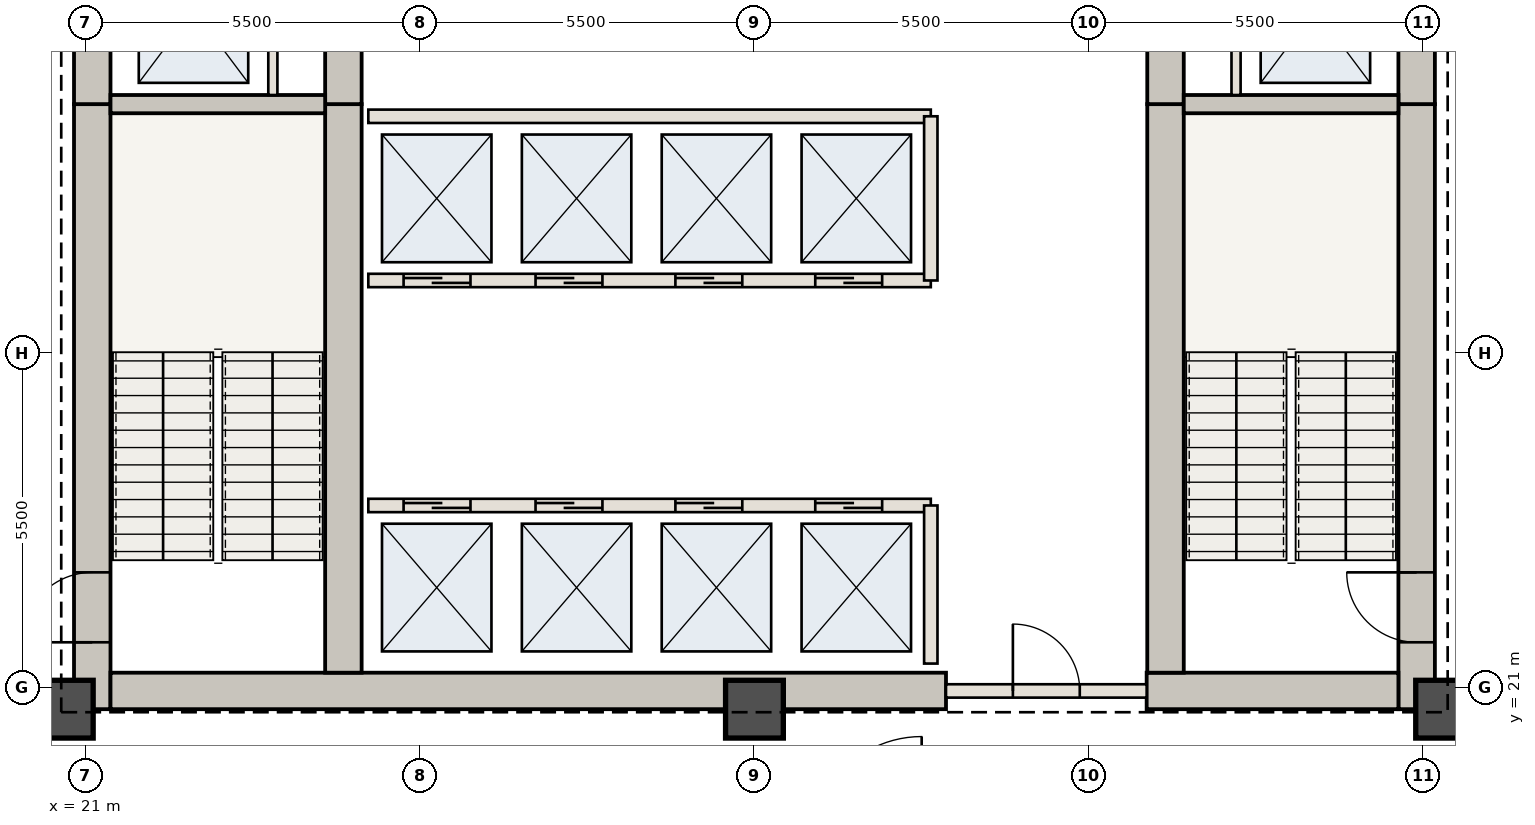
"""IFC4 building model, lengths in metres.
Left out: names, types, materials, properties, quantities, classifications, styles, units other than length and angle.
Written with IfcOpenShell. Run it as: python <this file> out.ifc"""

import sys

from ifc_helpers import new_model, si_unit, direction, frame, frame_2d, origin, origin_2d, place, context, subcontext, project, spatial, rectangle, extrude, element, fill, save


model = new_model("IFC4")
c1 = context("Model", 3, precision=1e-05, world=origin(), true_north=direction((0.0, 1.0)))
c2 = subcontext(c1, "Body", "Model", "MODEL_VIEW")
j1 = project(units=[si_unit("LENGTHUNIT", "METRE"), si_unit("PLANEANGLEUNIT", "RADIAN")], contexts=[c1])
p1 = place(None, origin())
s1 = spatial("IfcSite", under=j1, at=p1, CompositionType="ELEMENT")
p2 = place(p1, origin())
s2 = spatial("IfcBuilding", under=s1, at=p2, CompositionType="ELEMENT")
p3 = place(p2, frame((0.0, 0.0, 106.05)))
s3 = spatial("IfcBuildingStorey", under=s2, at=p3, CompositionType="ELEMENT", Elevation=106.05)
p4 = place(p3, frame((21.11, 20.65, 0.0), z_axis=(0.0, 0.0, 1.0), x_axis=(0.0, 1.0, 0.0)))
e1 = element("IfcWall", 1, at=p4, inside=s3, PredefinedType="SHEAR", context=c2, shape_type="SweptSolid", body=[
    extrude(rectangle(XDim=9.95, YDim=0.6, at=frame_2d((4.975, 0.0))), origin(), (0.0, 0.0, 1.0), 4.55),
])
p5 = place(p4, frame((1.1, 0.0, 0.0)))
e2 = element("IfcOpeningElement", 2, at=p5, cuts=e1, PredefinedType="OPENING", context=c2, shape_type="SweptSolid", body=[
    extrude(rectangle(XDim=1.15, YDim=2.15, at=frame_2d((0.575, 1.075))), frame((0.0, 0.31, 0.0), z_axis=(0.0, -1.0, 0.0), x_axis=(1.0, 0.0, 0.0)), (0.0, 0.0, 1.0), 0.62),
])
p6 = place(p3, frame((21.11, 30.6, 0.0), z_axis=(0.0, 0.0, 1.0), x_axis=(0.0, 1.0, 0.0)))
e3 = element("IfcWall", 3, at=p6, inside=s3, PredefinedType="SHEAR", context=c2, shape_type="SweptSolid", body=[
    extrude(rectangle(XDim=12.7, YDim=0.6, at=frame_2d((6.35, 0.0))), origin(), (0.0, 0.0, 1.0), 4.55),
])
p7 = place(p6, frame((4.2, 0.0, 0.0)))
e4 = element("IfcOpeningElement", 4, at=p7, cuts=e3, PredefinedType="OPENING", context=c2, shape_type="SweptSolid", body=[
    extrude(rectangle(XDim=1.1, YDim=2.15, at=frame_2d((0.55, 1.075))), frame((0.0, 0.31, 0.0), z_axis=(0.0, -1.0, 0.0), x_axis=(1.0, 0.0, 0.0)), (0.0, 0.0, 1.0), 0.62),
])
p8 = place(p6, frame((9.2, 0.0, 0.0)))
e5 = element("IfcOpeningElement", 5, at=p8, cuts=e3, PredefinedType="OPENING", context=c2, shape_type="SweptSolid", body=[
    extrude(rectangle(XDim=0.92, YDim=2.1, at=frame_2d((0.46, 1.05))), frame((0.0, 0.31, 0.0), z_axis=(0.0, -1.0, 0.0), x_axis=(1.0, 0.0, 0.0)), (0.0, 0.0, 1.0), 0.62),
])
p9 = place(p3, frame((42.89, 20.65, 0.0), z_axis=(0.0, 0.0, 1.0), x_axis=(0.0, 1.0, 0.0)))
e6 = element("IfcWall", 6, at=p9, inside=s3, PredefinedType="SHEAR", context=c2, shape_type="SweptSolid", body=[
    extrude(rectangle(XDim=9.95, YDim=0.6, at=frame_2d((4.975, 0.0))), origin(), (0.0, 0.0, 1.0), 4.55),
])
p10 = place(p9, frame((1.1, 0.0, 0.0)))
e7 = element("IfcOpeningElement", 7, at=p10, cuts=e6, PredefinedType="OPENING", context=c2, shape_type="SweptSolid", body=[
    extrude(rectangle(XDim=1.15, YDim=2.15, at=frame_2d((0.575, 1.075))), frame((0.0, 0.31, 0.0), z_axis=(0.0, -1.0, 0.0), x_axis=(1.0, 0.0, 0.0)), (0.0, 0.0, 1.0), 0.62),
])
p11 = place(p3, frame((42.89, 30.6, 0.0), z_axis=(0.0, 0.0, 1.0), x_axis=(0.0, 1.0, 0.0)))
e8 = element("IfcWall", 8, at=p11, inside=s3, PredefinedType="SHEAR", context=c2, shape_type="SweptSolid", body=[
    extrude(rectangle(XDim=12.7, YDim=0.6, at=frame_2d((6.35, 0.0))), origin(), (0.0, 0.0, 1.0), 4.55),
])
p12 = place(p11, frame((4.2, 0.0, 0.0)))
e9 = element("IfcOpeningElement", 9, at=p12, cuts=e8, PredefinedType="OPENING", context=c2, shape_type="SweptSolid", body=[
    extrude(rectangle(XDim=1.1, YDim=2.15, at=frame_2d((0.55, 1.075))), frame((0.0, 0.31, 0.0), z_axis=(0.0, -1.0, 0.0), x_axis=(1.0, 0.0, 0.0)), (0.0, 0.0, 1.0), 0.62),
])
p13 = place(p11, frame((8.05, 0.0, 0.0)))
e10 = element("IfcOpeningElement", 10, at=p13, cuts=e8, PredefinedType="OPENING", context=c2, shape_type="SweptSolid", body=[
    extrude(rectangle(XDim=0.88, YDim=2.1, at=frame_2d((0.44, 1.05))), frame((0.0, 0.31, 0.0), z_axis=(0.0, -1.0, 0.0), x_axis=(1.0, 0.0, 0.0)), (0.0, 0.0, 1.0), 0.62),
])
p14 = place(p11, frame((9.45, 0.0, 0.0)))
e11 = element("IfcOpeningElement", 11, at=p14, cuts=e8, PredefinedType="OPENING", context=c2, shape_type="SweptSolid", body=[
    extrude(rectangle(XDim=0.88, YDim=2.1, at=frame_2d((0.44, 1.05))), frame((0.0, 0.31, 0.0), z_axis=(0.0, -1.0, 0.0), x_axis=(1.0, 0.0, 0.0)), (0.0, 0.0, 1.0), 0.62),
])
p15 = place(p11, frame((10.85, 0.0, 0.0)))
e12 = element("IfcOpeningElement", 12, at=p15, cuts=e8, PredefinedType="OPENING", context=c2, shape_type="SweptSolid", body=[
    extrude(rectangle(XDim=0.88, YDim=2.1, at=frame_2d((0.44, 1.05))), frame((0.0, 0.31, 0.0), z_axis=(0.0, -1.0, 0.0), x_axis=(1.0, 0.0, 0.0)), (0.0, 0.0, 1.0), 0.62),
])
p16 = place(p3, frame((21.41, 20.95, 0.0), z_axis=(0.0, 0.0, 1.0), x_axis=(1.0, 0.0, 0.0)))
e13 = element("IfcWall", 13, at=p16, inside=s3, PredefinedType="SHEAR", context=c2, shape_type="SweptSolid", body=[
    extrude(rectangle(XDim=13.74, YDim=0.6, at=frame_2d((6.87, 0.0))), origin(), (0.0, 0.0, 1.0), 4.55),
])
p17 = place(p3, frame((38.45, 20.95, 0.0), z_axis=(0.0, 0.0, 1.0), x_axis=(1.0, 0.0, 0.0)))
e14 = element("IfcWall", 14, at=p17, inside=s3, PredefinedType="SHEAR", context=c2, shape_type="SweptSolid", body=[
    extrude(rectangle(XDim=4.14, YDim=0.6, at=frame_2d((2.07, 0.0))), origin(), (0.0, 0.0, 1.0), 4.55),
])
p18 = place(p3, frame((25.24, 21.25, 0.0), z_axis=(0.0, 0.0, 1.0), x_axis=(0.0, 1.0, 0.0)))
e15 = element("IfcWall", 15, at=p18, inside=s3, PredefinedType="SHEAR", context=c2, shape_type="SweptSolid", body=[
    extrude(rectangle(XDim=9.35, YDim=0.6, at=frame_2d((4.675, 0.0))), origin(), (0.0, 0.0, 1.0), 4.55),
])
p19 = place(p3, frame((25.24, 30.6, 0.0), z_axis=(0.0, 0.0, 1.0), x_axis=(0.0, 1.0, 0.0)))
e16 = element("IfcWall", 16, at=p19, inside=s3, PredefinedType="SHEAR", context=c2, shape_type="SweptSolid", body=[
    extrude(rectangle(XDim=12.1, YDim=0.6, at=frame_2d((6.05, 0.0))), origin(), (0.0, 0.0, 1.0), 4.55),
])
p20 = place(p19, frame((6.25, 0.0, 0.0)))
e17 = element("IfcOpeningElement", 17, at=p20, cuts=e16, PredefinedType="OPENING", context=c2, shape_type="SweptSolid", body=[
    extrude(rectangle(XDim=1.1, YDim=2.15, at=frame_2d((0.55, 1.075))), frame((0.0, 0.31, 0.0), z_axis=(0.0, -1.0, 0.0), x_axis=(1.0, 0.0, 0.0)), (0.0, 0.0, 1.0), 0.62),
])
p21 = place(p3, frame((38.76, 21.25, 0.0), z_axis=(0.0, 0.0, 1.0), x_axis=(0.0, 1.0, 0.0)))
e18 = element("IfcWall", 18, at=p21, inside=s3, PredefinedType="SHEAR", context=c2, shape_type="SweptSolid", body=[
    extrude(rectangle(XDim=9.35, YDim=0.6, at=frame_2d((4.675, 0.0))), origin(), (0.0, 0.0, 1.0), 4.55),
])
p22 = place(p3, frame((38.76, 30.6, 0.0), z_axis=(0.0, 0.0, 1.0), x_axis=(0.0, 1.0, 0.0)))
e19 = element("IfcWall", 19, at=p22, inside=s3, PredefinedType="SHEAR", context=c2, shape_type="SweptSolid", body=[
    extrude(rectangle(XDim=12.1, YDim=0.6, at=frame_2d((6.05, 0.0))), origin(), (0.0, 0.0, 1.0), 4.55),
])
for number, where, z_axis, x_axis in (
    (20, (20.65, 20.65, 0.0), (0.0, 0.0, 1.0), (1.0, 0.0, 0.0)),
    (21, (32.0, 20.65, 0.0), (0.0, 0.0, 1.0), (1.0, 0.0, 0.0)),
    (22, (43.35, 20.65, 0.0), (0.0, 0.0, 1.0), (1.0, 0.0, 0.0)),
):
    element("IfcColumn", number, at=place(p3, frame(where, z_axis=z_axis, x_axis=x_axis)), inside=s3, PredefinedType="COLUMN", context=c2, shape_type="SweptSolid", body=[
        extrude(rectangle(XDim=0.95, YDim=0.95, at=origin_2d()), origin(), (0.0, 0.0, 1.0), 4.55),
    ])
for number, where, z_axis, x_axis in (
    (23, (21.41, 30.6, 0.0), (0.0, 0.0, 1.0), (1.0, 0.0, 0.0)),
    (24, (39.06, 30.6, 0.0), (0.0, 0.0, 1.0), (1.0, 0.0, 0.0)),
):
    element("IfcWall", number, at=place(p3, frame(where, z_axis=z_axis, x_axis=x_axis)), inside=s3, PredefinedType="SHEAR", context=c2, shape_type="SweptSolid", body=[
        extrude(rectangle(XDim=3.53, YDim=0.3, at=frame_2d((1.765, 0.0))), origin(), (0.0, 0.0, 1.0), 4.13),
    ])
for number, where, z_axis, x_axis in (
    (25, (24.08, 30.75, 0.0), (0.0, 0.0, 1.0), (0.0, 1.0, 0.0)),
    (26, (39.92, 30.75, 0.0), (0.0, 0.0, 1.0), (0.0, 1.0, 0.0)),
):
    element("IfcWall", number, at=place(p3, frame(where, z_axis=z_axis, x_axis=x_axis)), inside=s3, PredefinedType="STANDARD", context=c2, shape_type="SweptSolid", body=[
        extrude(rectangle(XDim=2.65, YDim=0.15, at=frame_2d((1.325, 0.0))), origin(), (0.0, 0.0, 1.0), 4.13),
    ])
p23 = place(p3, frame((35.15, 20.95, 0.0), z_axis=(0.0, 0.0, 1.0), x_axis=(1.0, 0.0, 0.0)))
e27 = element("IfcWall", 27, at=p23, inside=s3, PredefinedType="STANDARD", context=c2, shape_type="SweptSolid", body=[
    extrude(rectangle(XDim=3.3, YDim=0.22, at=frame_2d((1.65, 0.0))), origin(), (0.0, 0.0, 1.0), 4.13),
])
p24 = place(p23, frame((1.1, 0.0, 0.0)))
e28 = element("IfcOpeningElement", 28, at=p24, cuts=e27, PredefinedType="OPENING", context=c2, shape_type="SweptSolid", body=[
    extrude(rectangle(XDim=1.1, YDim=2.15, at=frame_2d((0.55, 1.075))), frame((0.0, 0.12, 0.0), z_axis=(0.0, -1.0, 0.0), x_axis=(1.0, 0.0, 0.0)), (0.0, 0.0, 1.0), 0.24),
])
p25 = place(p3, frame((25.65, 24.0, 0.0), z_axis=(0.0, 0.0, 1.0), x_axis=(1.0, 0.0, 0.0)))
e29 = element("IfcWall", 29, at=p25, inside=s3, PredefinedType="STANDARD", context=c2, shape_type="SweptSolid", body=[
    extrude(rectangle(XDim=9.25, YDim=0.22, at=frame_2d((4.625, 0.0))), origin(), (0.0, 0.0, 1.0), 4.13),
])
p26 = place(p25, frame((0.58, 0.0, 0.0)))
e30 = element("IfcOpeningElement", 30, at=p26, cuts=e29, PredefinedType="OPENING", context=c2, shape_type="SweptSolid", body=[
    extrude(rectangle(XDim=1.1, YDim=2.15, at=frame_2d((0.55, 1.075))), frame((0.0, 0.12, 0.0), z_axis=(0.0, -1.0, 0.0), x_axis=(1.0, 0.0, 0.0)), (0.0, 0.0, 1.0), 0.24),
])
p27 = place(p25, frame((2.75, 0.0, 0.0)))
e31 = element("IfcOpeningElement", 31, at=p27, cuts=e29, PredefinedType="OPENING", context=c2, shape_type="SweptSolid", body=[
    extrude(rectangle(XDim=1.1, YDim=2.15, at=frame_2d((0.55, 1.075))), frame((0.0, 0.12, 0.0), z_axis=(0.0, -1.0, 0.0), x_axis=(1.0, 0.0, 0.0)), (0.0, 0.0, 1.0), 0.24),
])
p28 = place(p25, frame((5.05, 0.0, 0.0)))
e32 = element("IfcOpeningElement", 32, at=p28, cuts=e29, PredefinedType="OPENING", context=c2, shape_type="SweptSolid", body=[
    extrude(rectangle(XDim=1.1, YDim=2.15, at=frame_2d((0.55, 1.075))), frame((0.0, 0.12, 0.0), z_axis=(0.0, -1.0, 0.0), x_axis=(1.0, 0.0, 0.0)), (0.0, 0.0, 1.0), 0.24),
])
p29 = place(p25, frame((7.35, 0.0, 0.0)))
e33 = element("IfcOpeningElement", 33, at=p29, cuts=e29, PredefinedType="OPENING", context=c2, shape_type="SweptSolid", body=[
    extrude(rectangle(XDim=1.1, YDim=2.15, at=frame_2d((0.55, 1.075))), frame((0.0, 0.12, 0.0), z_axis=(0.0, -1.0, 0.0), x_axis=(1.0, 0.0, 0.0)), (0.0, 0.0, 1.0), 0.24),
])
p30 = place(p3, frame((34.9, 21.4, 0.0), z_axis=(0.0, 0.0, 1.0), x_axis=(0.0, 1.0, 0.0)))
e34 = element("IfcWall", 34, at=p30, inside=s3, PredefinedType="STANDARD", context=c2, shape_type="SweptSolid", body=[
    extrude(rectangle(XDim=2.6, YDim=0.22, at=frame_2d((1.3, 0.0))), origin(), (0.0, 0.0, 1.0), 4.13),
])
p31 = place(p3, frame((25.65, 27.7, 0.0), z_axis=(0.0, 0.0, 1.0), x_axis=(1.0, 0.0, 0.0)))
e35 = element("IfcWall", 35, at=p31, inside=s3, PredefinedType="STANDARD", context=c2, shape_type="SweptSolid", body=[
    extrude(rectangle(XDim=9.25, YDim=0.22, at=frame_2d((4.625, 0.0))), origin(), (0.0, 0.0, 1.0), 4.13),
])
p32 = place(p31, frame((0.58, 0.0, 0.0)))
e36 = element("IfcOpeningElement", 36, at=p32, cuts=e35, PredefinedType="OPENING", context=c2, shape_type="SweptSolid", body=[
    extrude(rectangle(XDim=1.1, YDim=2.15, at=frame_2d((0.55, 1.075))), frame((0.0, 0.12, 0.0), z_axis=(0.0, -1.0, 0.0), x_axis=(1.0, 0.0, 0.0)), (0.0, 0.0, 1.0), 0.24),
])
p33 = place(p31, frame((2.75, 0.0, 0.0)))
e37 = element("IfcOpeningElement", 37, at=p33, cuts=e35, PredefinedType="OPENING", context=c2, shape_type="SweptSolid", body=[
    extrude(rectangle(XDim=1.1, YDim=2.15, at=frame_2d((0.55, 1.075))), frame((0.0, 0.12, 0.0), z_axis=(0.0, -1.0, 0.0), x_axis=(1.0, 0.0, 0.0)), (0.0, 0.0, 1.0), 0.24),
])
p34 = place(p31, frame((5.05, 0.0, 0.0)))
e38 = element("IfcOpeningElement", 38, at=p34, cuts=e35, PredefinedType="OPENING", context=c2, shape_type="SweptSolid", body=[
    extrude(rectangle(XDim=1.1, YDim=2.15, at=frame_2d((0.55, 1.075))), frame((0.0, 0.12, 0.0), z_axis=(0.0, -1.0, 0.0), x_axis=(1.0, 0.0, 0.0)), (0.0, 0.0, 1.0), 0.24),
])
p35 = place(p31, frame((7.35, 0.0, 0.0)))
e39 = element("IfcOpeningElement", 39, at=p35, cuts=e35, PredefinedType="OPENING", context=c2, shape_type="SweptSolid", body=[
    extrude(rectangle(XDim=1.1, YDim=2.15, at=frame_2d((0.55, 1.075))), frame((0.0, 0.12, 0.0), z_axis=(0.0, -1.0, 0.0), x_axis=(1.0, 0.0, 0.0)), (0.0, 0.0, 1.0), 0.24),
])
p36 = place(p3, frame((25.65, 30.4, 0.0), z_axis=(0.0, 0.0, 1.0), x_axis=(1.0, 0.0, 0.0)))
e40 = element("IfcWall", 40, at=p36, inside=s3, PredefinedType="STANDARD", context=c2, shape_type="SweptSolid", body=[
    extrude(rectangle(XDim=9.25, YDim=0.22, at=frame_2d((4.625, 0.0))), origin(), (0.0, 0.0, 1.0), 4.13),
])
p37 = place(p3, frame((34.9, 27.7, 0.0), z_axis=(0.0, 0.0, 1.0), x_axis=(0.0, 1.0, 0.0)))
e41 = element("IfcWall", 41, at=p37, inside=s3, PredefinedType="STANDARD", context=c2, shape_type="SweptSolid", body=[
    extrude(rectangle(XDim=2.7, YDim=0.22, at=frame_2d((1.35, 0.0))), origin(), (0.0, 0.0, 1.0), 4.13),
])
p38 = place(p5, origin())
e42 = element("IfcDoor", 42, at=p38, inside=s3, OperationType="SINGLE_SWING_LEFT", PredefinedType="DOOR", context=c2, shape_type="SweptSolid", body=[
    extrude(rectangle(XDim=1.15, YDim=2.15, at=frame_2d((0.575, 1.075))), frame((0.0, 0.025, 0.0), z_axis=(0.0, -1.0, 0.0), x_axis=(1.0, 0.0, 0.0)), (0.0, 0.0, 1.0), 0.05),
])
fill(e2, e42)
p39 = place(p10, origin())
e43 = element("IfcDoor", 43, at=p39, inside=s3, OperationType="SINGLE_SWING_RIGHT", PredefinedType="DOOR", context=c2, shape_type="SweptSolid", body=[
    extrude(rectangle(XDim=1.15, YDim=2.15, at=frame_2d((0.575, 1.075))), frame((0.0, 0.025, 0.0), z_axis=(0.0, -1.0, 0.0), x_axis=(1.0, 0.0, 0.0)), (0.0, 0.0, 1.0), 0.05),
])
fill(e7, e43)
p40 = place(p24, origin())
e44 = element("IfcDoor", 44, at=p40, inside=s3, OperationType="SINGLE_SWING_LEFT", PredefinedType="DOOR", context=c2, shape_type="SweptSolid", body=[
    extrude(rectangle(XDim=1.1, YDim=2.15, at=frame_2d((0.55, 1.075))), frame((0.0, 0.025, 0.0), z_axis=(0.0, -1.0, 0.0), x_axis=(1.0, 0.0, 0.0)), (0.0, 0.0, 1.0), 0.05),
])
fill(e28, e44)
p41 = place(p26, origin())
e45 = element("IfcDoor", 45, at=p41, inside=s3, OperationType="DOUBLE_DOOR_SLIDING", PredefinedType="DOOR", context=c2, shape_type="SweptSolid", body=[
    extrude(rectangle(XDim=1.1, YDim=2.15, at=frame_2d((0.55, 1.075))), frame((0.0, 0.025, 0.0), z_axis=(0.0, -1.0, 0.0), x_axis=(1.0, 0.0, 0.0)), (0.0, 0.0, 1.0), 0.05),
])
fill(e30, e45)
p42 = place(p27, origin())
e46 = element("IfcDoor", 46, at=p42, inside=s3, OperationType="DOUBLE_DOOR_SLIDING", PredefinedType="DOOR", context=c2, shape_type="SweptSolid", body=[
    extrude(rectangle(XDim=1.1, YDim=2.15, at=frame_2d((0.55, 1.075))), frame((0.0, 0.025, 0.0), z_axis=(0.0, -1.0, 0.0), x_axis=(1.0, 0.0, 0.0)), (0.0, 0.0, 1.0), 0.05),
])
fill(e31, e46)
p43 = place(p28, origin())
e47 = element("IfcDoor", 47, at=p43, inside=s3, OperationType="DOUBLE_DOOR_SLIDING", PredefinedType="DOOR", context=c2, shape_type="SweptSolid", body=[
    extrude(rectangle(XDim=1.1, YDim=2.15, at=frame_2d((0.55, 1.075))), frame((0.0, 0.025, 0.0), z_axis=(0.0, -1.0, 0.0), x_axis=(1.0, 0.0, 0.0)), (0.0, 0.0, 1.0), 0.05),
])
fill(e32, e47)
p44 = place(p29, origin())
e48 = element("IfcDoor", 48, at=p44, inside=s3, OperationType="DOUBLE_DOOR_SLIDING", PredefinedType="DOOR", context=c2, shape_type="SweptSolid", body=[
    extrude(rectangle(XDim=1.1, YDim=2.15, at=frame_2d((0.55, 1.075))), frame((0.0, 0.025, 0.0), z_axis=(0.0, -1.0, 0.0), x_axis=(1.0, 0.0, 0.0)), (0.0, 0.0, 1.0), 0.05),
])
fill(e33, e48)
p45 = place(p32, origin())
e49 = element("IfcDoor", 49, at=p45, inside=s3, OperationType="DOUBLE_DOOR_SLIDING", PredefinedType="DOOR", context=c2, shape_type="SweptSolid", body=[
    extrude(rectangle(XDim=1.1, YDim=2.15, at=frame_2d((0.55, 1.075))), frame((0.0, 0.025, 0.0), z_axis=(0.0, -1.0, 0.0), x_axis=(1.0, 0.0, 0.0)), (0.0, 0.0, 1.0), 0.05),
])
fill(e36, e49)
p46 = place(p33, origin())
e50 = element("IfcDoor", 50, at=p46, inside=s3, OperationType="DOUBLE_DOOR_SLIDING", PredefinedType="DOOR", context=c2, shape_type="SweptSolid", body=[
    extrude(rectangle(XDim=1.1, YDim=2.15, at=frame_2d((0.55, 1.075))), frame((0.0, 0.025, 0.0), z_axis=(0.0, -1.0, 0.0), x_axis=(1.0, 0.0, 0.0)), (0.0, 0.0, 1.0), 0.05),
])
fill(e37, e50)
p47 = place(p34, origin())
e51 = element("IfcDoor", 51, at=p47, inside=s3, OperationType="DOUBLE_DOOR_SLIDING", PredefinedType="DOOR", context=c2, shape_type="SweptSolid", body=[
    extrude(rectangle(XDim=1.1, YDim=2.15, at=frame_2d((0.55, 1.075))), frame((0.0, 0.025, 0.0), z_axis=(0.0, -1.0, 0.0), x_axis=(1.0, 0.0, 0.0)), (0.0, 0.0, 1.0), 0.05),
])
fill(e38, e51)
p48 = place(p35, origin())
e52 = element("IfcDoor", 52, at=p48, inside=s3, OperationType="DOUBLE_DOOR_SLIDING", PredefinedType="DOOR", context=c2, shape_type="SweptSolid", body=[
    extrude(rectangle(XDim=1.1, YDim=2.15, at=frame_2d((0.55, 1.075))), frame((0.0, 0.025, 0.0), z_axis=(0.0, -1.0, 0.0), x_axis=(1.0, 0.0, 0.0)), (0.0, 0.0, 1.0), 0.05),
])
fill(e39, e52)
save(model, sys.argv[1])
